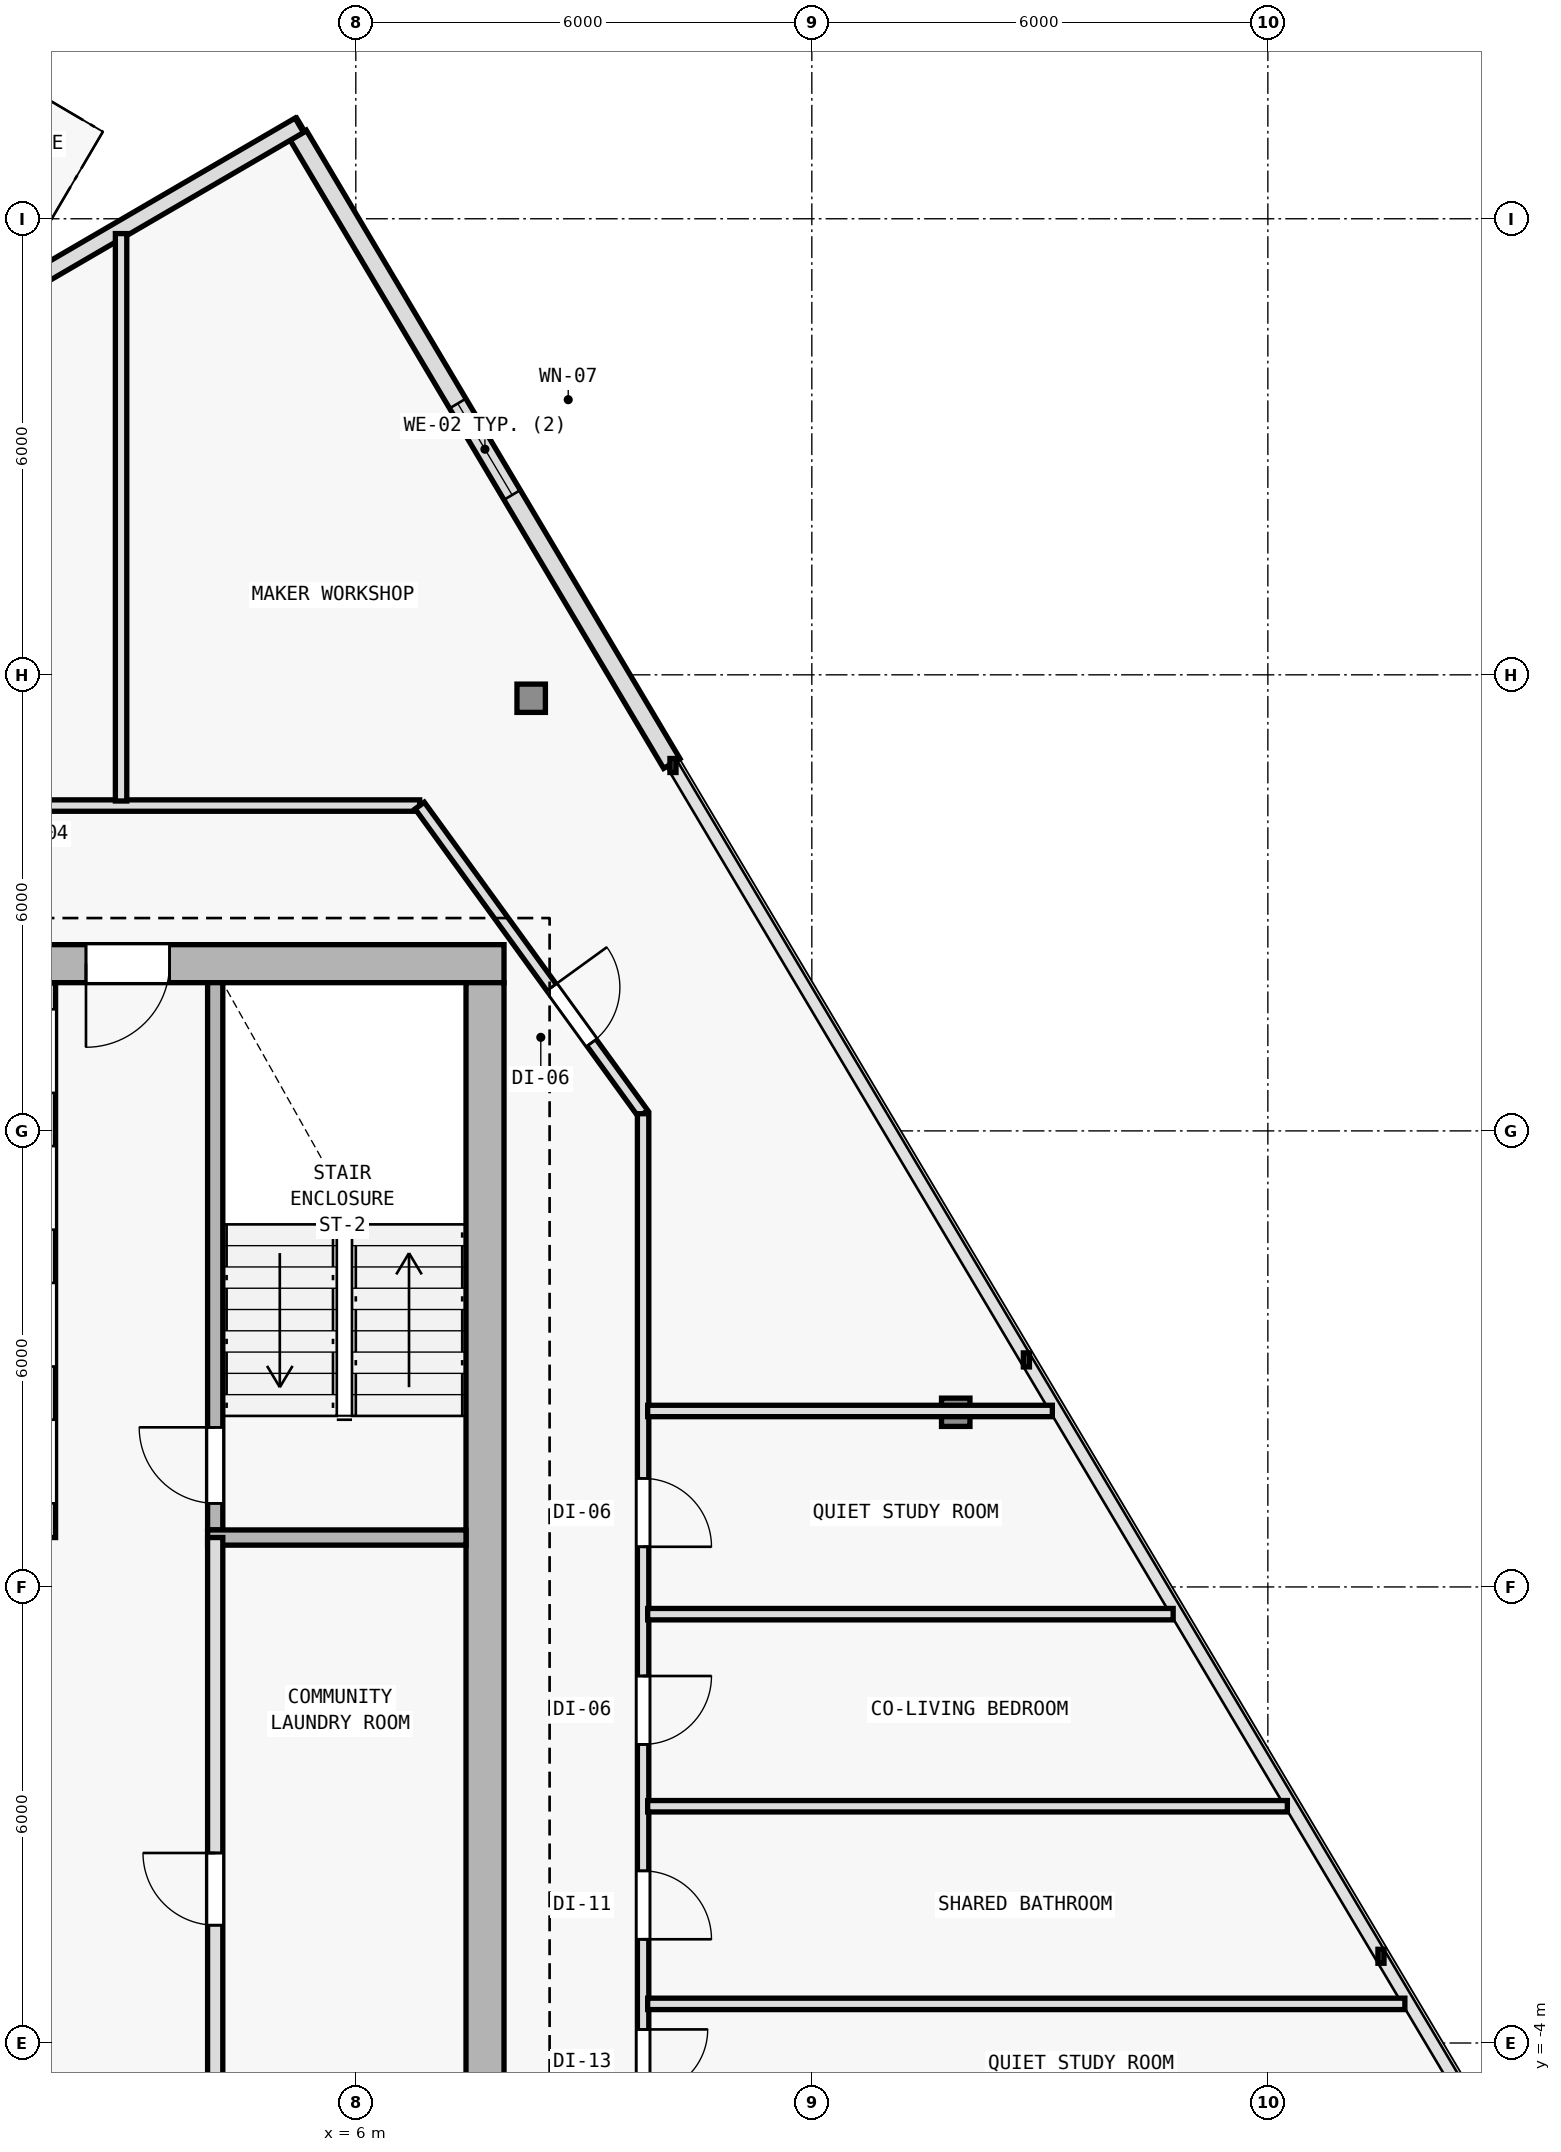
"""IFC4 building model, lengths in metres.
Left out: names, types, materials, properties, quantities, classifications, styles, units other than length and angle.
Written with IfcOpenShell. Run it as: python <this file> out.ifc"""

import sys

from ifc_helpers import new_model, si_unit, direction, frame, frame_2d, origin, origin_2d, place, context, subcontext, project, spatial, rectangle, i_section, extrude, element, fill, save


model = new_model("IFC4")
c1 = context("Model", 3, precision=1e-05, world=origin(), true_north=direction((0.0, 1.0)))
c2 = subcontext(c1, "Body", "Model", "MODEL_VIEW")
j1 = project(units=[si_unit("LENGTHUNIT", "METRE"), si_unit("PLANEANGLEUNIT", "RADIAN")], contexts=[c1])
p1 = place(None, origin())
s1 = spatial("IfcSite", under=j1, at=p1, CompositionType="ELEMENT")
p2 = place(p1, origin())
s2 = spatial("IfcBuilding", under=s1, at=p2, CompositionType="ELEMENT")
p3 = place(p2, frame((0.0, 0.0, 254.4)))
s3 = spatial("IfcBuildingStorey", under=s2, at=p3, CompositionType="ELEMENT", Elevation=254.4)
for number, where, z_axis, x_axis in (
    (1, (7.7, 10.2, 0.0), (0.0, 0.0, 1.0), (1.0, 0.0, 0.0)),
    (2, (7.7, 0.4, 0.0), (0.0, 0.0, 1.0), (1.0, 0.0, 0.0)),
):
    element("IfcColumn", number, at=place(p3, frame(where, z_axis=z_axis, x_axis=x_axis)), inside=s3, PredefinedType="COLUMN", context=c2, shape_type="SweptSolid", body=[
        extrude(i_section(OverallWidth=0.374, OverallDepth=0.372, WebThickness=0.012, FlangeThickness=0.02, FilletRadius=0.015, at=origin_2d()), origin(), (0.0, 0.0, 1.0), 3.6),
    ])
p4 = place(p3, frame((13.893, 4.298, 0.006), z_axis=(-0.01897531407, 0.009521662974, 0.999774612295), x_axis=(-0.44849454954, -0.893785566583, 0.0)))
e3 = element("IfcColumn", 3, at=p4, inside=s3, PredefinedType="COLUMN", context=c2, shape_type="SweptSolid", body=[
    extrude(i_section(OverallWidth=0.374, OverallDepth=0.372, WebThickness=0.012, FlangeThickness=0.02, FilletRadius=0.015, at=origin_2d()), origin(), (0.0, 0.0, 1.0), 3.59),
])
p5 = place(p3, frame((8.308, 13.692, 0.006), z_axis=(-0.011767853257, -0.00258484638, 0.999927415465), x_axis=(0.214538664031, -0.976715496773, 0.0)))
e4 = element("IfcColumn", 4, at=p5, inside=s3, PredefinedType="COLUMN", context=c2, shape_type="SweptSolid", body=[
    extrude(i_section(OverallWidth=0.374, OverallDepth=0.372, WebThickness=0.012, FlangeThickness=0.02, FilletRadius=0.015, at=origin_2d()), origin(), (0.0, 0.0, 1.0), 3.589),
])
p6 = place(p3, frame((5.24, 21.103, 0.0), z_axis=(0.0, 0.0, 1.0), x_axis=(0.511088566076, -0.859528055171, 0.0)))
e5 = element("IfcWall", 5, at=p6, inside=s3, PredefinedType="SOLIDWALL", context=c2, shape_type="SweptSolid", body=[
    extrude(rectangle(XDim=9.622, YDim=0.25, at=frame_2d((4.811, 0.0))), origin(), (0.0, 0.0, 1.0), 3.35),
])
p7 = place(p6, frame((4.111, 0.0, 0.62)))
e6 = element("IfcOpeningElement", 6, at=p7, cuts=e5, PredefinedType="OPENING", context=c2, shape_type="SweptSolid", body=[
    extrude(rectangle(XDim=1.4, YDim=2.0, at=frame_2d((0.7, 1.0))), frame((0.0, 0.135, 0.0), z_axis=(0.0, -1.0, 0.0), x_axis=(1.0, 0.0, 0.0)), (0.0, 0.0, 1.0), 0.27),
])
p8 = place(p3, frame((1.832, 19.234, 0.0), z_axis=(0.0, 0.0, 1.0), x_axis=(0.86397765749, 0.503530145432, 0.0)))
e7 = element("IfcWall", 7, at=p8, inside=s3, PredefinedType="SOLIDWALL", context=c2, shape_type="SweptSolid", body=[
    extrude(rectangle(XDim=3.964, YDim=0.22, at=frame_2d((1.982, 0.0))), origin(), (0.0, 0.0, 1.0), 3.35),
])
p9 = place(p3, frame((7.95, 10.2, 0.0), z_axis=(0.0, 0.0, 1.0), x_axis=(-1.0, 0.0, 0.0)))
e8 = element("IfcWall", 8, at=p9, inside=s3, PredefinedType="SHEAR", context=c2, shape_type="SweptSolid", body=[
    extrude(rectangle(XDim=15.9, YDim=0.5, at=frame_2d((7.95, 0.0))), origin(), (0.0, 0.0, 1.0), 3.35),
])
p10 = place(p9, frame((4.4, 0.0, 0.0)))
e9 = element("IfcOpeningElement", 9, at=p10, cuts=e8, PredefinedType="OPENING", context=c2, shape_type="SweptSolid", body=[
    extrude(rectangle(XDim=1.1, YDim=2.15, at=frame_2d((0.55, 1.075))), frame((0.0, 0.26, 0.0), z_axis=(0.0, -1.0, 0.0), x_axis=(1.0, 0.0, 0.0)), (0.0, 0.0, 1.0), 0.52),
])
p11 = place(p3, frame((7.7, 9.95, 0.0), z_axis=(0.0, 0.0, 1.0), x_axis=(0.0, -1.0, 0.0)))
e10 = element("IfcWall", 10, at=p11, inside=s3, PredefinedType="SHEAR", context=c2, shape_type="SweptSolid", body=[
    extrude(rectangle(XDim=19.1, YDim=0.5, at=frame_2d((9.55, 0.0))), origin(), (0.0, 0.0, 1.0), 3.35),
])
p12 = place(p3, frame((4.15, 2.75, 0.0), z_axis=(0.0, 0.0, 1.0), x_axis=(0.0, 1.0, 0.0)))
e11 = element("IfcWall", 11, at=p12, inside=s3, PredefinedType="SOLIDWALL", context=c2, shape_type="SweptSolid", body=[
    extrude(rectangle(XDim=7.2, YDim=0.2, at=frame_2d((3.6, 0.0))), origin(), (0.0, 0.0, 1.0), 3.35),
])
p13 = place(p12, frame((0.35, 0.0, 0.0)))
e12 = element("IfcOpeningElement", 12, at=p13, cuts=e11, PredefinedType="OPENING", context=c2, shape_type="SweptSolid", body=[
    extrude(rectangle(XDim=1.0, YDim=2.15, at=frame_2d((0.5, 1.075))), frame((0.0, 0.11, 0.0), z_axis=(0.0, -1.0, 0.0), x_axis=(1.0, 0.0, 0.0)), (0.0, 0.0, 1.0), 0.22),
])
p14 = place(p3, frame((4.05, 2.65, 0.0), z_axis=(0.0, 0.0, 1.0), x_axis=(1.0, 0.0, 0.0)))
e13 = element("IfcWall", 13, at=p14, inside=s3, PredefinedType="SOLIDWALL", context=c2, shape_type="SweptSolid", body=[
    extrude(rectangle(XDim=3.4, YDim=0.2, at=frame_2d((1.7, 0.0))), origin(), (0.0, 0.0, 1.0), 3.35),
])
p15 = place(p3, frame((4.15, -6.05, 0.0), z_axis=(0.0, 0.0, 1.0), x_axis=(0.0, 1.0, 0.0)))
e14 = element("IfcWall", 14, at=p15, inside=s3, PredefinedType="SOLIDWALL", context=c2, shape_type="SweptSolid", body=[
    extrude(rectangle(XDim=8.7, YDim=0.2, at=frame_2d((4.35, 0.0))), origin(), (0.0, 0.0, 1.0), 3.35),
])
p16 = place(p15, frame((3.6, 0.0, 0.0)))
e15 = element("IfcOpeningElement", 15, at=p16, cuts=e14, PredefinedType="OPENING", context=c2, shape_type="SweptSolid", body=[
    extrude(rectangle(XDim=0.95, YDim=2.1, at=frame_2d((0.475, 1.05))), frame((0.0, 0.11, 0.0), z_axis=(0.0, -1.0, 0.0), x_axis=(1.0, 0.0, 0.0)), (0.0, 0.0, 1.0), 0.22),
])
p17 = place(p3, frame((1.95, 2.65, 0.0), z_axis=(0.0, 0.0, 1.0), x_axis=(0.0, 1.0, 0.0)))
e16 = element("IfcWall", 16, at=p17, inside=s3, PredefinedType="SOLIDWALL", context=c2, shape_type="SweptSolid", body=[
    extrude(rectangle(XDim=7.295, YDim=0.2, at=frame_2d((3.647, 0.0))), origin(), (0.0, 0.0, 1.0), 3.35),
])
p18 = place(p17, frame((0.45, 0.0, 0.0)))
e17 = element("IfcOpeningElement", 17, at=p18, cuts=e16, PredefinedType="OPENING", context=c2, shape_type="SweptSolid", body=[
    extrude(rectangle(XDim=1.1, YDim=2.15, at=frame_2d((0.55, 1.075))), frame((0.0, 0.11, 0.0), z_axis=(0.0, -1.0, 0.0), x_axis=(1.0, 0.0, 0.0)), (0.0, 0.0, 1.0), 0.22),
])
p19 = place(p17, frame((2.25, 0.0, 0.0)))
e18 = element("IfcOpeningElement", 18, at=p19, cuts=e16, PredefinedType="OPENING", context=c2, shape_type="SweptSolid", body=[
    extrude(rectangle(XDim=1.1, YDim=2.15, at=frame_2d((0.55, 1.075))), frame((0.0, 0.11, 0.0), z_axis=(0.0, -1.0, 0.0), x_axis=(1.0, 0.0, 0.0)), (0.0, 0.0, 1.0), 0.22),
])
p20 = place(p17, frame((4.05, 0.0, 0.0)))
e19 = element("IfcOpeningElement", 19, at=p20, cuts=e16, PredefinedType="OPENING", context=c2, shape_type="SweptSolid", body=[
    extrude(rectangle(XDim=1.1, YDim=2.15, at=frame_2d((0.55, 1.075))), frame((0.0, 0.11, 0.0), z_axis=(0.0, -1.0, 0.0), x_axis=(1.0, 0.0, 0.0)), (0.0, 0.0, 1.0), 0.22),
])
p21 = place(p17, frame((5.85, 0.0, 0.0)))
e20 = element("IfcOpeningElement", 20, at=p21, cuts=e16, PredefinedType="OPENING", context=c2, shape_type="SweptSolid", body=[
    extrude(rectangle(XDim=1.1, YDim=2.15, at=frame_2d((0.55, 1.075))), frame((0.0, 0.11, 0.0), z_axis=(0.0, -1.0, 0.0), x_axis=(1.0, 0.0, 0.0)), (0.0, 0.0, 1.0), 0.22),
])
p22 = place(p3, frame((-6.841, 12.28, 0.0), z_axis=(0.0, 0.0, 1.0), x_axis=(1.0, 0.0, 0.0)))
e21 = element("IfcWall", 21, at=p22, inside=s3, PredefinedType="PARTITIONING", context=c2, shape_type="SweptSolid", body=[
    extrude(rectangle(XDim=13.682, YDim=0.15, at=frame_2d((6.841, 0.0))), origin(), (0.0, 0.0, 1.0), 3.015),
])
p23 = place(p22, frame((4.825, 0.0, 0.0)))
e22 = element("IfcOpeningElement", 22, at=p23, cuts=e21, PredefinedType="OPENING", context=c2, shape_type="SweptSolid", body=[
    extrude(rectangle(XDim=0.9, YDim=2.1, at=frame_2d((0.45, 1.05))), frame((0.0, 0.085, 0.0), z_axis=(0.0, -1.0, 0.0), x_axis=(1.0, 0.0, 0.0)), (0.0, 0.0, 1.0), 0.17),
])
p24 = place(p3, frame((6.841, 12.28, 0.0), z_axis=(0.0, 0.0, 1.0), x_axis=(0.586956386413, -0.809618552436, 0.0)))
e23 = element("IfcWall", 23, at=p24, inside=s3, PredefinedType="PARTITIONING", context=c2, shape_type="SweptSolid", body=[
    extrude(rectangle(XDim=5.008, YDim=0.15, at=frame_2d((2.504, 0.0))), origin(), (0.0, 0.0, 1.0), 2.825),
])
p25 = place(p24, frame((2.954, 0.0, 0.0)))
e24 = element("IfcOpeningElement", 24, at=p25, cuts=e23, PredefinedType="OPENING", context=c2, shape_type="SweptSolid", body=[
    extrude(rectangle(XDim=0.9, YDim=2.1, at=frame_2d((0.45, 1.05))), frame((0.0, 0.085, 0.0), z_axis=(0.0, -1.0, 0.0), x_axis=(1.0, 0.0, 0.0)), (0.0, 0.0, 1.0), 0.17),
])
p26 = place(p3, frame((9.78, 8.226, 0.0), z_axis=(0.0, 0.0, 1.0), x_axis=(0.0, -1.0, 0.0)))
e25 = element("IfcWall", 25, at=p26, inside=s3, PredefinedType="PARTITIONING", context=c2, shape_type="SweptSolid", body=[
    extrude(rectangle(XDim=19.706, YDim=0.15, at=frame_2d((9.853, 0.0))), origin(), (0.0, 0.0, 1.0), 2.725),
])
p27 = place(p26, frame((17.432, 0.0, 0.0)))
e26 = element("IfcOpeningElement", 26, at=p27, cuts=e25, PredefinedType="OPENING", context=c2, shape_type="SweptSolid", body=[
    extrude(rectangle(XDim=0.9, YDim=2.1, at=frame_2d((0.45, 1.05))), frame((0.0, 0.085, 0.0), z_axis=(0.0, -1.0, 0.0), x_axis=(1.0, 0.0, 0.0)), (0.0, 0.0, 1.0), 0.17),
])
p28 = place(p26, frame((15.084, 0.0, 0.0)))
e27 = element("IfcOpeningElement", 27, at=p28, cuts=e25, PredefinedType="OPENING", context=c2, shape_type="SweptSolid", body=[
    extrude(rectangle(XDim=0.85, YDim=2.1, at=frame_2d((0.425, 1.05))), frame((0.0, 0.085, 0.0), z_axis=(0.0, -1.0, 0.0), x_axis=(1.0, 0.0, 0.0)), (0.0, 0.0, 1.0), 0.17),
])
p29 = place(p26, frame((13.608, 0.0, 0.0)))
e28 = element("IfcOpeningElement", 28, at=p29, cuts=e25, PredefinedType="OPENING", context=c2, shape_type="SweptSolid", body=[
    extrude(rectangle(XDim=0.85, YDim=2.1, at=frame_2d((0.425, 1.05))), frame((0.0, 0.085, 0.0), z_axis=(0.0, -1.0, 0.0), x_axis=(1.0, 0.0, 0.0)), (0.0, 0.0, 1.0), 0.17),
])
p30 = place(p26, frame((12.047, 0.0, 0.0)))
e29 = element("IfcOpeningElement", 29, at=p30, cuts=e25, PredefinedType="OPENING", context=c2, shape_type="SweptSolid", body=[
    extrude(rectangle(XDim=0.85, YDim=2.1, at=frame_2d((0.425, 1.05))), frame((0.0, 0.085, 0.0), z_axis=(0.0, -1.0, 0.0), x_axis=(1.0, 0.0, 0.0)), (0.0, 0.0, 1.0), 0.17),
])
p31 = place(p26, frame((9.961, 0.0, 0.0)))
e30 = element("IfcOpeningElement", 30, at=p31, cuts=e25, PredefinedType="OPENING", context=c2, shape_type="SweptSolid", body=[
    extrude(rectangle(XDim=0.9, YDim=2.1, at=frame_2d((0.45, 1.05))), frame((0.0, 0.085, 0.0), z_axis=(0.0, -1.0, 0.0), x_axis=(1.0, 0.0, 0.0)), (0.0, 0.0, 1.0), 0.17),
])
p32 = place(p26, frame((7.397, 0.0, 0.0)))
e31 = element("IfcOpeningElement", 31, at=p32, cuts=e25, PredefinedType="OPENING", context=c2, shape_type="SweptSolid", body=[
    extrude(rectangle(XDim=0.9, YDim=2.1, at=frame_2d((0.45, 1.05))), frame((0.0, 0.085, 0.0), z_axis=(0.0, -1.0, 0.0), x_axis=(1.0, 0.0, 0.0)), (0.0, 0.0, 1.0), 0.17),
])
p33 = place(p26, frame((4.797, 0.0, 0.0)))
e32 = element("IfcOpeningElement", 32, at=p33, cuts=e25, PredefinedType="OPENING", context=c2, shape_type="SweptSolid", body=[
    extrude(rectangle(XDim=0.9, YDim=2.1, at=frame_2d((0.45, 1.05))), frame((0.0, 0.085, 0.0), z_axis=(0.0, -1.0, 0.0), x_axis=(1.0, 0.0, 0.0)), (0.0, 0.0, 1.0), 0.17),
])
p34 = place(p3, frame((9.84, 4.315, 0.0), z_axis=(0.0, 0.0, 1.0), x_axis=(1.0, 0.0, 0.0)))
e33 = element("IfcWall", 33, at=p34, inside=s3, PredefinedType="PARTITIONING", context=c2, shape_type="SweptSolid", body=[
    extrude(rectangle(XDim=5.324, YDim=0.15, at=frame_2d((2.662, 0.0))), origin(), (0.0, 0.0, 1.0), 2.825),
])
p35 = place(p3, frame((9.84, -0.885, 0.0), z_axis=(0.0, 0.0, 1.0), x_axis=(1.0, 0.0, 0.0)))
e34 = element("IfcWall", 34, at=p35, inside=s3, PredefinedType="PARTITIONING", context=c2, shape_type="SweptSolid", body=[
    extrude(rectangle(XDim=8.417, YDim=0.15, at=frame_2d((4.208, 0.0))), origin(), (0.0, 0.0, 1.0), 2.775),
])
p36 = place(p3, frame((9.84, -3.485, 0.0), z_axis=(0.0, 0.0, 1.0), x_axis=(1.0, 0.0, 0.0)))
e35 = element("IfcWall", 35, at=p36, inside=s3, PredefinedType="PARTITIONING", context=c2, shape_type="SweptSolid", body=[
    extrude(rectangle(XDim=9.962, YDim=0.15, at=frame_2d((4.981, 0.0))), origin(), (0.0, 0.0, 1.0), 2.775),
])
p37 = place(p3, frame((9.84, 1.642, 0.0), z_axis=(0.0, 0.0, 1.0), x_axis=(1.0, 0.0, 0.0)))
e36 = element("IfcWall", 36, at=p37, inside=s3, PredefinedType="PARTITIONING", context=c2, shape_type="SweptSolid", body=[
    extrude(rectangle(XDim=6.914, YDim=0.15, at=frame_2d((3.457, 0.0))), origin(), (0.0, 0.0, 1.0), 2.775),
])
p38 = place(p3, frame((2.912, 12.34, 0.0), z_axis=(0.0, 0.0, 1.0), x_axis=(0.0, 1.0, 0.0)))
e37 = element("IfcWall", 37, at=p38, inside=s3, PredefinedType="PARTITIONING", context=c2, shape_type="SweptSolid", body=[
    extrude(rectangle(XDim=7.465, YDim=0.15, at=frame_2d((3.732, 0.0))), origin(), (0.0, 0.0, 1.0), 3.015),
])
p39 = place(p7, origin())
e38 = element("IfcWindow", 38, at=p39, inside=s3, PartitioningType="SINGLE_PANEL", PredefinedType="WINDOW", context=c2, shape_type="SweptSolid", body=[
    extrude(rectangle(XDim=1.4, YDim=2.0, at=frame_2d((0.7, 1.0))), frame((0.0, 0.03, 0.0), z_axis=(0.0, -1.0, 0.0), x_axis=(1.0, 0.0, 0.0)), (0.0, 0.0, 1.0), 0.06),
])
fill(e6, e38)
p40 = place(p10, origin())
e39 = element("IfcDoor", 39, at=p40, inside=s3, OperationType="SINGLE_SWING_RIGHT", PredefinedType="DOOR", context=c2, shape_type="SweptSolid", body=[
    extrude(rectangle(XDim=1.1, YDim=2.15, at=frame_2d((0.55, 1.075))), frame((0.0, 0.025, 0.0), z_axis=(0.0, -1.0, 0.0), x_axis=(1.0, 0.0, 0.0)), (0.0, 0.0, 1.0), 0.05),
])
fill(e9, e39)
p41 = place(p13, origin())
e40 = element("IfcDoor", 40, at=p41, inside=s3, OperationType="SINGLE_SWING_RIGHT", PredefinedType="DOOR", context=c2, shape_type="SweptSolid", body=[
    extrude(rectangle(XDim=1.0, YDim=2.15, at=frame_2d((0.5, 1.075))), frame((0.0, 0.025, 0.0), z_axis=(0.0, -1.0, 0.0), x_axis=(1.0, 0.0, 0.0)), (0.0, 0.0, 1.0), 0.05),
])
fill(e12, e40)
p42 = place(p16, origin())
e41 = element("IfcDoor", 41, at=p42, inside=s3, OperationType="SINGLE_SWING_RIGHT", PredefinedType="DOOR", context=c2, shape_type="SweptSolid", body=[
    extrude(rectangle(XDim=0.95, YDim=2.1, at=frame_2d((0.475, 1.05))), frame((0.0, 0.025, 0.0), z_axis=(0.0, -1.0, 0.0), x_axis=(1.0, 0.0, 0.0)), (0.0, 0.0, 1.0), 0.05),
])
fill(e15, e41)
p43 = place(p30, origin())
e42 = element("IfcDoor", 42, at=p43, inside=s3, OperationType="SINGLE_SWING_LEFT", PredefinedType="DOOR", context=c2, shape_type="SweptSolid", body=[
    extrude(rectangle(XDim=0.85, YDim=2.1, at=frame_2d((0.425, 1.05))), frame((0.0, 0.025, 0.0), z_axis=(0.0, -1.0, 0.0), x_axis=(1.0, 0.0, 0.0)), (0.0, 0.0, 1.0), 0.05),
])
fill(e29, e42)
p44 = place(p31, origin())
e43 = element("IfcDoor", 43, at=p44, inside=s3, OperationType="SINGLE_SWING_RIGHT", PredefinedType="DOOR", context=c2, shape_type="SweptSolid", body=[
    extrude(rectangle(XDim=0.9, YDim=2.1, at=frame_2d((0.45, 1.05))), frame((0.0, 0.025, 0.0), z_axis=(0.0, -1.0, 0.0), x_axis=(1.0, 0.0, 0.0)), (0.0, 0.0, 1.0), 0.05),
])
fill(e30, e43)
p45 = place(p32, origin())
e44 = element("IfcDoor", 44, at=p45, inside=s3, OperationType="SINGLE_SWING_LEFT", PredefinedType="DOOR", context=c2, shape_type="SweptSolid", body=[
    extrude(rectangle(XDim=0.9, YDim=2.1, at=frame_2d((0.45, 1.05))), frame((0.0, 0.025, 0.0), z_axis=(0.0, -1.0, 0.0), x_axis=(1.0, 0.0, 0.0)), (0.0, 0.0, 1.0), 0.05),
])
fill(e31, e44)
p46 = place(p33, origin())
e45 = element("IfcDoor", 45, at=p46, inside=s3, OperationType="SINGLE_SWING_RIGHT", PredefinedType="DOOR", context=c2, shape_type="SweptSolid", body=[
    extrude(rectangle(XDim=0.9, YDim=2.1, at=frame_2d((0.45, 1.05))), frame((0.0, 0.025, 0.0), z_axis=(0.0, -1.0, 0.0), x_axis=(1.0, 0.0, 0.0)), (0.0, 0.0, 1.0), 0.05),
])
fill(e32, e45)
p47 = place(p25, origin())
e46 = element("IfcDoor", 46, at=p47, inside=s3, OperationType="SINGLE_SWING_LEFT", PredefinedType="DOOR", context=c2, shape_type="SweptSolid", body=[
    extrude(rectangle(XDim=0.9, YDim=2.1, at=frame_2d((0.45, 1.05))), frame((0.0, 0.025, 0.0), z_axis=(0.0, -1.0, 0.0), x_axis=(1.0, 0.0, 0.0)), (0.0, 0.0, 1.0), 0.05),
])
fill(e24, e46)
save(model, sys.argv[1])
